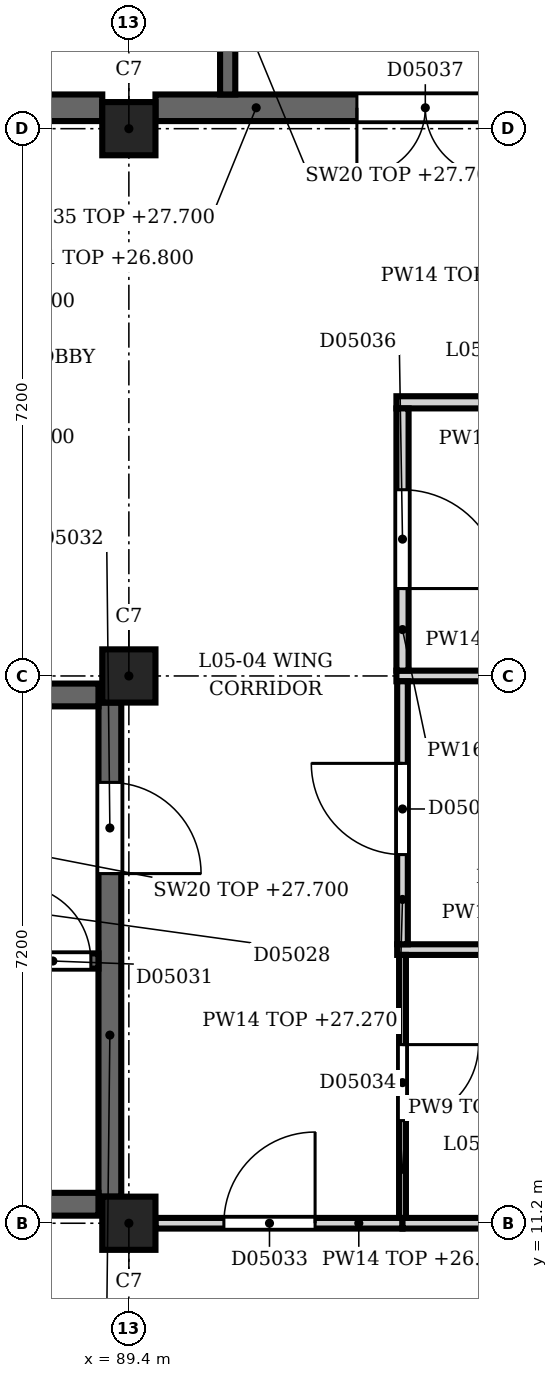
"""IFC4 building model, lengths in metres.
Left out: names, types, materials, properties, quantities, classifications, styles, units other than length and angle.
Written with IfcOpenShell. Run it as: python <this file> out.ifc"""

import sys

from ifc_helpers import new_model, si_unit, direction, frame, frame_2d, origin, origin_2d, place, context, subcontext, project, spatial, rectangle, extrude, element, fill, save


model = new_model("IFC4")
c1 = context("Model", 3, precision=1e-05, world=origin(), true_north=direction((0.0, 1.0)))
c2 = subcontext(c1, "Body", "Model", "MODEL_VIEW")
j1 = project(units=[si_unit("LENGTHUNIT", "METRE"), si_unit("PLANEANGLEUNIT", "RADIAN")], contexts=[c1])
p1 = place(None, origin())
s1 = spatial("IfcSite", under=j1, at=p1, CompositionType="ELEMENT")
p2 = place(p1, origin())
s2 = spatial("IfcBuilding", under=s1, at=p2, CompositionType="ELEMENT")
p3 = place(p2, frame((0.0, 0.0, 23.4)))
s3 = spatial("IfcBuildingStorey", under=s2, at=p3, CompositionType="ELEMENT", Elevation=23.4)
for number, where, z_axis, x_axis in (
    (1, (89.4, 11.2, 0.0), (0.0, 0.0, 1.0), (1.0, 0.0, 0.0)),
    (2, (89.4, 18.4, 0.0), (0.0, 0.0, 1.0), (1.0, 0.0, 0.0)),
    (3, (89.4, 25.6, 0.0), (0.0, 0.0, 1.0), (1.0, 0.0, 0.0)),
):
    element("IfcColumn", number, at=place(p3, frame(where, z_axis=z_axis, x_axis=x_axis)), inside=s3, PredefinedType="COLUMN", context=c2, shape_type="SweptSolid", body=[
        extrude(rectangle(XDim=0.7, YDim=0.7, at=origin_2d()), origin(), (0.0, 0.0, 1.0), 4.5),
    ])
p4 = place(p3, frame((82.5, 25.875, 0.0), z_axis=(0.0, 0.0, 1.0), x_axis=(1.0, 0.0, 0.0)))
e4 = element("IfcWall", 4, at=p4, inside=s3, PredefinedType="SHEAR", context=c2, shape_type="SweptSolid", body=[
    extrude(rectangle(XDim=6.55, YDim=0.35, at=frame_2d((3.275, 0.0))), origin(), (0.0, 0.0, 1.0), 4.3),
])
p5 = place(p4, frame((3.9, 0.0, 0.0)))
e5 = element("IfcOpeningElement", 5, at=p5, cuts=e4, PredefinedType="OPENING", context=c2, shape_type="SweptSolid", body=[
    extrude(rectangle(XDim=1.2, YDim=2.1, at=frame_2d((0.6, 1.05))), frame((0.0, 0.185, 0.0), z_axis=(0.0, -1.0, 0.0), x_axis=(1.0, 0.0, 0.0)), (0.0, 0.0, 1.0), 0.37),
])
p6 = place(p3, frame((89.75, 25.875, 0.0), z_axis=(0.0, 0.0, 1.0), x_axis=(1.0, 0.0, 0.0)))
e6 = element("IfcWall", 6, at=p6, inside=s3, PredefinedType="SHEAR", context=c2, shape_type="SweptSolid", body=[
    extrude(rectangle(XDim=6.5, YDim=0.35, at=frame_2d((3.25, 0.0))), origin(), (0.0, 0.0, 1.0), 4.3),
])
p7 = place(p6, frame((2.65, 0.0, 0.0)))
e7 = element("IfcOpeningElement", 7, at=p7, cuts=e6, PredefinedType="OPENING", context=c2, shape_type="SweptSolid", body=[
    extrude(rectangle(XDim=1.8, YDim=2.1, at=frame_2d((0.9, 1.05))), frame((0.0, 0.185, 0.0), z_axis=(0.0, -1.0, 0.0), x_axis=(1.0, 0.0, 0.0)), (0.0, 0.0, 1.0), 0.37),
])
p8 = place(p3, frame((90.7, 26.05, 0.0), z_axis=(0.0, 0.0, 1.0), x_axis=(0.0, 1.0, 0.0)))
e8 = element("IfcWall", 8, at=p8, inside=s3, PredefinedType="SHEAR", context=c2, shape_type="SweptSolid", body=[
    extrude(rectangle(XDim=3.05, YDim=0.2, at=frame_2d((1.525, 0.0))), origin(), (0.0, 0.0, 1.0), 4.3),
])
p9 = place(p3, frame((89.15, 11.55, 0.0), z_axis=(0.0, 0.0, 1.0), x_axis=(0.0, 1.0, 0.0)))
e9 = element("IfcWall", 9, at=p9, inside=s3, PredefinedType="SHEAR", context=c2, shape_type="SweptSolid", body=[
    extrude(rectangle(XDim=6.5, YDim=0.3, at=frame_2d((3.25, 0.0))), origin(), (0.0, 0.0, 1.0), 4.3),
])
p10 = place(p9, frame((4.25, 0.0, 0.0)))
e10 = element("IfcOpeningElement", 10, at=p10, cuts=e9, PredefinedType="OPENING", context=c2, shape_type="SweptSolid", body=[
    extrude(rectangle(XDim=1.2, YDim=2.1, at=frame_2d((0.6, 1.05))), frame((0.0, 0.16, 0.0), z_axis=(0.0, -1.0, 0.0), x_axis=(1.0, 0.0, 0.0)), (0.0, 0.0, 1.0), 0.32),
])
for number, where, z_axis, x_axis in (
    (11, (82.6, 11.45, 0.0), (0.0, 0.0, 1.0), (1.0, 0.0, 0.0)),
    (12, (82.6, 18.15, 0.0), (0.0, 0.0, 1.0), (1.0, 0.0, 0.0)),
):
    element("IfcWall", number, at=place(p3, frame(where, z_axis=z_axis, x_axis=x_axis)), inside=s3, PredefinedType="SHEAR", context=c2, shape_type="SweptSolid", body=[
        extrude(rectangle(XDim=6.4, YDim=0.3, at=frame_2d((3.2, 0.0))), origin(), (0.0, 0.0, 1.0), 4.3),
    ])
p11 = place(p3, frame((89.0, 14.65, 0.0), z_axis=(0.0, 0.0, 1.0), x_axis=(-1.0, 0.0, 0.0)))
e13 = element("IfcWall", 13, at=p11, inside=s3, PredefinedType="SHEAR", context=c2, shape_type="SweptSolid", body=[
    extrude(rectangle(XDim=6.4, YDim=0.2, at=frame_2d((3.2, 0.0))), origin(), (0.0, 0.0, 1.0), 4.3),
])
p12 = place(p11, frame((0.1, 0.0, 0.0)))
e14 = element("IfcOpeningElement", 14, at=p12, cuts=e13, PredefinedType="OPENING", context=c2, shape_type="SweptSolid", body=[
    extrude(rectangle(XDim=1.0, YDim=2.1, at=frame_2d((0.5, 1.05))), frame((0.0, 0.11, 0.0), z_axis=(0.0, -1.0, 0.0), x_axis=(1.0, 0.0, 0.0)), (0.0, 0.0, 1.0), 0.22),
])
p13 = place(p3, frame((93.0, 11.2, 0.0), z_axis=(0.0, 0.0, 1.0), x_axis=(-1.0, 0.0, 0.0)))
e15 = element("IfcWall", 15, at=p13, inside=s3, PredefinedType="PARTITIONING", context=c2, shape_type="SweptSolid", body=[
    extrude(rectangle(XDim=3.25, YDim=0.14, at=frame_2d((1.625, 0.0))), origin(), (0.0, 0.0, 1.0), 3.47),
])
p14 = place(p13, frame((1.15, 0.0, 0.0)))
e16 = element("IfcOpeningElement", 16, at=p14, cuts=e15, PredefinedType="OPENING", context=c2, shape_type="SweptSolid", body=[
    extrude(rectangle(XDim=1.2, YDim=2.2, at=frame_2d((0.6, 1.1))), frame((0.0, 0.08, 0.0), z_axis=(0.0, -1.0, 0.0), x_axis=(1.0, 0.0, 0.0)), (0.0, 0.0, 1.0), 0.16),
])
p15 = place(p3, frame((93.0, 11.2, 0.0), z_axis=(0.0, 0.0, 1.0), x_axis=(1.0, 0.0, 0.0)))
e17 = element("IfcWall", 17, at=p15, inside=s3, PredefinedType="PARTITIONING", context=c2, shape_type="SweptSolid", body=[
    extrude(rectangle(XDim=3.25, YDim=0.14, at=frame_2d((1.625, 0.0))), origin(), (0.0, 0.0, 1.0), 3.47),
])
p16 = place(p3, frame((92.93, 14.8, 0.0), z_axis=(0.0, 0.0, 1.0), x_axis=(1.0, 0.0, 0.0)))
e18 = element("IfcWall", 18, at=p16, inside=s3, PredefinedType="PARTITIONING", context=c2, shape_type="SweptSolid", body=[
    extrude(rectangle(XDim=3.74, YDim=0.14, at=frame_2d((1.87, 0.0))), origin(), (0.0, 0.0, 1.0), 4.3),
])
p17 = place(p3, frame((92.92, 18.4, 0.0), z_axis=(0.0, 0.0, 1.0), x_axis=(1.0, 0.0, 0.0)))
e19 = element("IfcWall", 19, at=p17, inside=s3, PredefinedType="PARTITIONING", context=c2, shape_type="SweptSolid", body=[
    extrude(rectangle(XDim=3.33, YDim=0.14, at=frame_2d((1.665, 0.0))), origin(), (0.0, 0.0, 1.0), 3.47),
])
p18 = place(p3, frame((92.92, 22.0, 0.0), z_axis=(0.0, 0.0, 1.0), x_axis=(1.0, 0.0, 0.0)))
e20 = element("IfcWall", 20, at=p18, inside=s3, PredefinedType="PARTITIONING", context=c2, shape_type="SweptSolid", body=[
    extrude(rectangle(XDim=3.68, YDim=0.16, at=frame_2d((1.84, 0.0))), origin(), (0.0, 0.0, 1.0), 4.3),
])
p19 = place(p3, frame((93.0, 14.73, 0.0), z_axis=(0.0, 0.0, 1.0), x_axis=(0.0, -1.0, 0.0)))
e21 = element("IfcWall", 21, at=p19, inside=s3, PredefinedType="PARTITIONING", context=c2, shape_type="SweptSolid", body=[
    extrude(rectangle(XDim=3.46, YDim=0.09, at=frame_2d((1.73, 0.0))), origin(), (0.0, 0.0, 1.0), 3.87),
])
p20 = place(p19, frame((1.18, 0.0, 0.0)))
e22 = element("IfcOpeningElement", 22, at=p20, cuts=e21, PredefinedType="OPENING", context=c2, shape_type="SweptSolid", body=[
    extrude(rectangle(XDim=1.0, YDim=2.2, at=frame_2d((0.5, 1.1))), frame((0.0, 0.055, 0.0), z_axis=(0.0, -1.0, 0.0), x_axis=(1.0, 0.0, 0.0)), (0.0, 0.0, 1.0), 0.11),
])
p21 = place(p3, frame((93.0, 18.33, 0.0), z_axis=(0.0, 0.0, 1.0), x_axis=(0.0, -1.0, 0.0)))
e23 = element("IfcWall", 23, at=p21, inside=s3, PredefinedType="PARTITIONING", context=c2, shape_type="SweptSolid", body=[
    extrude(rectangle(XDim=3.46, YDim=0.14, at=frame_2d((1.73, 0.0))), origin(), (0.0, 0.0, 1.0), 3.87),
])
p22 = place(p21, frame((1.08, 0.0, 0.0)))
e24 = element("IfcOpeningElement", 24, at=p22, cuts=e23, PredefinedType="OPENING", context=c2, shape_type="SweptSolid", body=[
    extrude(rectangle(XDim=1.2, YDim=2.1, at=frame_2d((0.6, 1.05))), frame((0.0, 0.08, 0.0), z_axis=(0.0, -1.0, 0.0), x_axis=(1.0, 0.0, 0.0)), (0.0, 0.0, 1.0), 0.16),
])
p23 = place(p3, frame((93.0, 21.92, 0.0), z_axis=(0.0, 0.0, 1.0), x_axis=(0.0, -1.0, 0.0)))
e25 = element("IfcWall", 25, at=p23, inside=s3, PredefinedType="PARTITIONING", context=c2, shape_type="SweptSolid", body=[
    extrude(rectangle(XDim=3.45, YDim=0.16, at=frame_2d((1.725, 0.0))), origin(), (0.0, 0.0, 1.0), 4.3),
])
p24 = place(p23, frame((1.07, 0.0, 0.0)))
e26 = element("IfcOpeningElement", 26, at=p24, cuts=e25, PredefinedType="OPENING", context=c2, shape_type="SweptSolid", body=[
    extrude(rectangle(XDim=1.3, YDim=2.2, at=frame_2d((0.65, 1.1))), frame((0.0, 0.09, 0.0), z_axis=(0.0, -1.0, 0.0), x_axis=(1.0, 0.0, 0.0)), (0.0, 0.0, 1.0), 0.18),
])
p25 = place(p7, origin())
e27 = element("IfcDoor", 27, at=p25, inside=s3, OperationType="SINGLE_SWING_LEFT", PredefinedType="DOOR", context=c2, shape_type="SweptSolid", body=[
    extrude(rectangle(XDim=1.8, YDim=2.1, at=frame_2d((0.9, 1.05))), frame((0.0, 0.025, 0.0), z_axis=(0.0, -1.0, 0.0), x_axis=(1.0, 0.0, 0.0)), (0.0, 0.0, 1.0), 0.05),
])
fill(e7, e27)
p26 = place(p10, origin())
e28 = element("IfcDoor", 28, at=p26, inside=s3, OperationType="SINGLE_SWING_RIGHT", PredefinedType="DOOR", context=c2, shape_type="SweptSolid", body=[
    extrude(rectangle(XDim=1.2, YDim=2.1, at=frame_2d((0.6, 1.05))), frame((0.0, 0.025, 0.0), z_axis=(0.0, -1.0, 0.0), x_axis=(1.0, 0.0, 0.0)), (0.0, 0.0, 1.0), 0.05),
])
fill(e10, e28)
p27 = place(p12, origin())
e29 = element("IfcDoor", 29, at=p27, inside=s3, OperationType="SINGLE_SWING_LEFT", PredefinedType="DOOR", context=c2, shape_type="SweptSolid", body=[
    extrude(rectangle(XDim=1.0, YDim=2.1, at=frame_2d((0.5, 1.05))), frame((0.0, 0.025, 0.0), z_axis=(0.0, -1.0, 0.0), x_axis=(1.0, 0.0, 0.0)), (0.0, 0.0, 1.0), 0.05),
])
fill(e14, e29)
p28 = place(p14, origin())
e30 = element("IfcDoor", 30, at=p28, inside=s3, OperationType="SINGLE_SWING_RIGHT", PredefinedType="DOOR", context=c2, shape_type="SweptSolid", body=[
    extrude(rectangle(XDim=1.2, YDim=2.2, at=frame_2d((0.6, 1.1))), frame((0.0, 0.025, 0.0), z_axis=(0.0, -1.0, 0.0), x_axis=(1.0, 0.0, 0.0)), (0.0, 0.0, 1.0), 0.05),
])
fill(e16, e30)
p29 = place(p20, origin())
e31 = element("IfcDoor", 31, at=p29, inside=s3, OperationType="SINGLE_SWING_LEFT", PredefinedType="DOOR", context=c2, shape_type="SweptSolid", body=[
    extrude(rectangle(XDim=1.0, YDim=2.2, at=frame_2d((0.5, 1.1))), frame((0.0, 0.025, 0.0), z_axis=(0.0, -1.0, 0.0), x_axis=(1.0, 0.0, 0.0)), (0.0, 0.0, 1.0), 0.05),
])
fill(e22, e31)
p30 = place(p22, origin())
e32 = element("IfcDoor", 32, at=p30, inside=s3, OperationType="SINGLE_SWING_LEFT", PredefinedType="DOOR", context=c2, shape_type="SweptSolid", body=[
    extrude(rectangle(XDim=1.2, YDim=2.1, at=frame_2d((0.6, 1.05))), frame((0.0, 0.025, 0.0), z_axis=(0.0, -1.0, 0.0), x_axis=(1.0, 0.0, 0.0)), (0.0, 0.0, 1.0), 0.05),
])
fill(e24, e32)
p31 = place(p24, origin())
e33 = element("IfcDoor", 33, at=p31, inside=s3, OperationType="SINGLE_SWING_LEFT", PredefinedType="DOOR", context=c2, shape_type="SweptSolid", body=[
    extrude(rectangle(XDim=1.3, YDim=2.2, at=frame_2d((0.65, 1.1))), frame((0.0, 0.025, 0.0), z_axis=(0.0, -1.0, 0.0), x_axis=(1.0, 0.0, 0.0)), (0.0, 0.0, 1.0), 0.05),
])
fill(e26, e33)
save(model, sys.argv[1])
